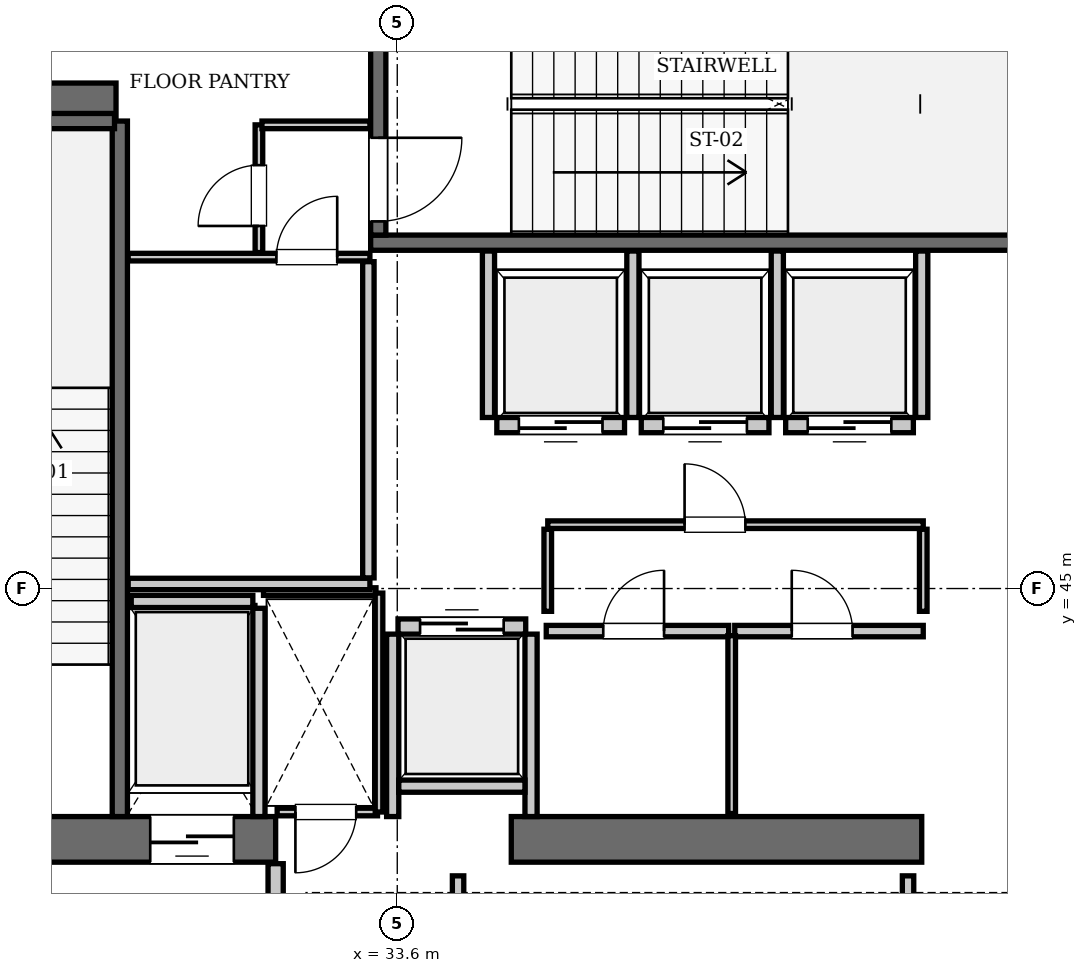
"""IFC4 building model, lengths in metres.
Left out: names, types, materials, properties, quantities, classifications, styles, units other than length and angle.
Written with IfcOpenShell. Run it as: python <this file> out.ifc"""

import sys

from ifc_helpers import new_model, si_unit, direction, frame, frame_2d, origin, place, context, subcontext, project, spatial, rectangle, extrude, element, fill, save


model = new_model("IFC4")
c1 = context("Model", 3, precision=1e-05, world=origin(), true_north=direction((0.0, 1.0)))
c2 = subcontext(c1, "Body", "Model", "MODEL_VIEW")
j1 = project(units=[si_unit("LENGTHUNIT", "METRE"), si_unit("PLANEANGLEUNIT", "RADIAN")], contexts=[c1])
p1 = place(None, origin())
s1 = spatial("IfcSite", under=j1, at=p1, CompositionType="ELEMENT")
p2 = place(p1, origin())
s2 = spatial("IfcBuilding", under=s1, at=p2, CompositionType="ELEMENT")
p3 = place(p2, frame((0.0, 0.0, 354.2)))
s3 = spatial("IfcBuildingStorey", under=s2, at=p3, CompositionType="ELEMENT", Elevation=354.2)
p4 = place(p3, frame((25.2, 41.7, 0.0), z_axis=(0.0, 0.0, 1.0), x_axis=(1.0, 0.0, 0.0)))
e1 = element("IfcWall", 1, at=p4, inside=s3, PredefinedType="SHEAR", context=c2, shape_type="SweptSolid", body=[
    extrude(rectangle(XDim=6.8, YDim=0.6, at=frame_2d((3.4, 0.0))), origin(), (0.0, 0.0, 1.0), 4.9),
])
p5 = place(p4, frame((1.65, 0.0, 0.0)))
e2 = element("IfcOpeningElement", 2, at=p5, cuts=e1, PredefinedType="OPENING", context=c2, shape_type="SweptSolid", body=[
    extrude(rectangle(XDim=1.15, YDim=2.15, at=frame_2d((0.575, 1.075))), frame((0.0, 0.31, 0.0), z_axis=(0.0, -1.0, 0.0), x_axis=(1.0, 0.0, 0.0)), (0.0, 0.0, 1.0), 0.62),
])
p6 = place(p4, frame((5.15, 0.0, 0.0)))
e3 = element("IfcOpeningElement", 3, at=p6, cuts=e1, PredefinedType="OPENING", context=c2, shape_type="SweptSolid", body=[
    extrude(rectangle(XDim=1.1, YDim=2.2, at=frame_2d((0.55, 1.1))), frame((0.0, 0.31, 0.0), z_axis=(0.0, -1.0, 0.0), x_axis=(1.0, 0.0, 0.0)), (0.0, 0.0, 1.0), 0.62),
])
p7 = place(p3, frame((35.1, 41.7, 0.0), z_axis=(0.0, 0.0, 1.0), x_axis=(1.0, 0.0, 0.0)))
e4 = element("IfcWall", 4, at=p7, inside=s3, PredefinedType="SHEAR", context=c2, shape_type="SweptSolid", body=[
    extrude(rectangle(XDim=5.4, YDim=0.6, at=frame_2d((2.7, 0.0))), origin(), (0.0, 0.0, 1.0), 4.9),
])
p8 = place(p3, frame((25.8, 51.4, 0.0), z_axis=(0.0, 0.0, 1.0), x_axis=(1.0, 0.0, 0.0)))
e5 = element("IfcWall", 5, at=p8, inside=s3, PredefinedType="SHEAR", context=c2, shape_type="SweptSolid", body=[
    extrude(rectangle(XDim=4.1, YDim=0.5, at=frame_2d((2.05, 0.0))), origin(), (0.0, 0.0, 1.0), 4.9),
])
p9 = place(p3, frame((29.95, 42.0, 0.0), z_axis=(0.0, 0.0, 1.0), x_axis=(0.0, 1.0, 0.0)))
e6 = element("IfcWall", 6, at=p9, inside=s3, PredefinedType="SOLIDWALL", context=c2, shape_type="SweptSolid", body=[
    extrude(rectangle(XDim=9.15, YDim=0.2, at=frame_2d((4.575, 0.0))), origin(), (0.0, 0.0, 1.0), 4.64),
])
p10 = place(p3, frame((26.38, 51.15, 0.0), z_axis=(0.0, 0.0, 1.0), x_axis=(1.0, 0.0, 0.0)))
e7 = element("IfcWall", 7, at=p10, inside=s3, PredefinedType="SOLIDWALL", context=c2, shape_type="SweptSolid", body=[
    extrude(rectangle(XDim=3.5, YDim=0.2, at=frame_2d((1.75, 0.0))), origin(), (0.0, 0.0, 1.0), 4.64),
])
p11 = place(p3, frame((33.25, 49.55, 0.0), z_axis=(0.0, 0.0, 1.0), x_axis=(1.0, 0.0, 0.0)))
e8 = element("IfcWall", 8, at=p11, inside=s3, PredefinedType="SOLIDWALL", context=c2, shape_type="SweptSolid", body=[
    extrude(rectangle(XDim=9.1, YDim=0.2, at=frame_2d((4.55, 0.0))), origin(), (0.0, 0.0, 1.0), 4.64),
])
p12 = place(p3, frame((33.35, 49.65, 0.0), z_axis=(0.0, 0.0, 1.0), x_axis=(0.0, 1.0, 0.0)))
e9 = element("IfcWall", 9, at=p12, inside=s3, PredefinedType="SOLIDWALL", context=c2, shape_type="SweptSolid", body=[
    extrude(rectangle(XDim=3.75, YDim=0.2, at=frame_2d((1.875, 0.0))), origin(), (0.0, 0.0, 1.0), 4.64),
])
p13 = place(p12, frame((0.18, 0.0, 0.0)))
e10 = element("IfcOpeningElement", 10, at=p13, cuts=e9, PredefinedType="OPENING", context=c2, shape_type="SweptSolid", body=[
    extrude(rectangle(XDim=1.1, YDim=2.15, at=frame_2d((0.55, 1.075))), frame((0.0, 0.11, 0.0), z_axis=(0.0, -1.0, 0.0), x_axis=(1.0, 0.0, 0.0)), (0.0, 0.0, 1.0), 0.22),
])
p14 = place(p3, frame((34.91, 47.15, 0.0), z_axis=(0.0, 0.0, 1.0), x_axis=(1.0, 0.0, 0.0)))
e11 = element("IfcWall", 11, at=p14, inside=s3, PredefinedType="SOLIDWALL", context=c2, shape_type="SweptSolid", body=[
    extrude(rectangle(XDim=1.68, YDim=0.2, at=frame_2d((0.84, 0.0))), origin(), (0.0, 0.0, 1.0), 4.64),
])
p15 = place(p14, frame((0.29, 0.0, 0.0)))
e12 = element("IfcOpeningElement", 12, at=p15, cuts=e11, PredefinedType="OPENING", context=c2, shape_type="SweptSolid", body=[
    extrude(rectangle(XDim=1.1, YDim=2.2, at=frame_2d((0.55, 1.1))), frame((0.0, 0.11, 0.0), z_axis=(0.0, -1.0, 0.0), x_axis=(1.0, 0.0, 0.0)), (0.0, 0.0, 1.0), 0.22),
])
p16 = place(p3, frame((36.81, 47.15, 0.0), z_axis=(0.0, 0.0, 1.0), x_axis=(1.0, 0.0, 0.0)))
e13 = element("IfcWall", 13, at=p16, inside=s3, PredefinedType="SOLIDWALL", context=c2, shape_type="SweptSolid", body=[
    extrude(rectangle(XDim=1.68, YDim=0.2, at=frame_2d((0.84, 0.0))), origin(), (0.0, 0.0, 1.0), 4.64),
])
p17 = place(p16, frame((0.29, 0.0, 0.0)))
e14 = element("IfcOpeningElement", 14, at=p17, cuts=e13, PredefinedType="OPENING", context=c2, shape_type="SweptSolid", body=[
    extrude(rectangle(XDim=1.1, YDim=2.2, at=frame_2d((0.55, 1.1))), frame((0.0, 0.11, 0.0), z_axis=(0.0, -1.0, 0.0), x_axis=(1.0, 0.0, 0.0)), (0.0, 0.0, 1.0), 0.22),
])
p18 = place(p3, frame((38.71, 47.15, 0.0), z_axis=(0.0, 0.0, 1.0), x_axis=(1.0, 0.0, 0.0)))
e15 = element("IfcWall", 15, at=p18, inside=s3, PredefinedType="SOLIDWALL", context=c2, shape_type="SweptSolid", body=[
    extrude(rectangle(XDim=1.68, YDim=0.2, at=frame_2d((0.84, 0.0))), origin(), (0.0, 0.0, 1.0), 4.64),
])
p19 = place(p18, frame((0.29, 0.0, 0.0)))
e16 = element("IfcOpeningElement", 16, at=p19, cuts=e15, PredefinedType="OPENING", context=c2, shape_type="SweptSolid", body=[
    extrude(rectangle(XDim=1.1, YDim=2.2, at=frame_2d((0.55, 1.1))), frame((0.0, 0.11, 0.0), z_axis=(0.0, -1.0, 0.0), x_axis=(1.0, 0.0, 0.0)), (0.0, 0.0, 1.0), 0.22),
])
p20 = place(p3, frame((33.61, 44.5, 0.0), z_axis=(0.0, 0.0, 1.0), x_axis=(1.0, 0.0, 0.0)))
e17 = element("IfcWall", 17, at=p20, inside=s3, PredefinedType="SOLIDWALL", context=c2, shape_type="SweptSolid", body=[
    extrude(rectangle(XDim=1.68, YDim=0.2, at=frame_2d((0.84, 0.0))), origin(), (0.0, 0.0, 1.0), 4.64),
])
p21 = place(p20, frame((0.29, 0.0, 0.0)))
e18 = element("IfcOpeningElement", 18, at=p21, cuts=e17, PredefinedType="OPENING", context=c2, shape_type="SweptSolid", body=[
    extrude(rectangle(XDim=1.1, YDim=2.2, at=frame_2d((0.55, 1.1))), frame((0.0, 0.11, 0.0), z_axis=(0.0, -1.0, 0.0), x_axis=(1.0, 0.0, 0.0)), (0.0, 0.0, 1.0), 0.22),
])
p22 = place(p3, frame((30.1, 44.83, 0.0), z_axis=(0.0, 0.0, 1.0), x_axis=(1.0, 0.0, 0.0)))
e19 = element("IfcWall", 19, at=p22, inside=s3, PredefinedType="SOLIDWALL", context=c2, shape_type="SweptSolid", body=[
    extrude(rectangle(XDim=1.6, YDim=0.16, at=frame_2d((0.8, 0.0))), origin(), (0.0, 0.0, 1.0), 4.64),
])
p23 = place(p3, frame((31.78, 42.0, 0.0), z_axis=(0.0, 0.0, 1.0), x_axis=(0.0, 1.0, 0.0)))
e20 = element("IfcWall", 20, at=p23, inside=s3, PredefinedType="SOLIDWALL", context=c2, shape_type="SweptSolid", body=[
    extrude(rectangle(XDim=2.74, YDim=0.16, at=frame_2d((1.37, 0.0))), origin(), (0.0, 0.0, 1.0), 4.64),
])
for number, where, z_axis, x_axis in (
    (21, (34.8, 47.25, 0.0), (0.0, 0.0, 1.0), (0.0, 1.0, 0.0)),
    (22, (36.7, 47.25, 0.0), (0.0, 0.0, 1.0), (0.0, 1.0, 0.0)),
    (23, (38.6, 47.25, 0.0), (0.0, 0.0, 1.0), (0.0, 1.0, 0.0)),
    (24, (40.5, 47.25, 0.0), (0.0, 0.0, 1.0), (0.0, 1.0, 0.0)),
):
    element("IfcWall", number, at=place(p3, frame(where, z_axis=z_axis, x_axis=x_axis)), inside=s3, PredefinedType="SOLIDWALL", context=c2, shape_type="SweptSolid", body=[
        extrude(rectangle(XDim=2.19, YDim=0.16, at=frame_2d((1.095, 0.0))), origin(), (0.0, 0.0, 1.0), 4.64),
    ])
for number, where, z_axis, x_axis in (
    (25, (33.54, 42.0, 0.0), (0.0, 0.0, 1.0), (0.0, 1.0, 0.0)),
    (26, (35.36, 42.0, 0.0), (0.0, 0.0, 1.0), (0.0, 1.0, 0.0)),
):
    element("IfcWall", number, at=place(p3, frame(where, z_axis=z_axis, x_axis=x_axis)), inside=s3, PredefinedType="SOLIDWALL", context=c2, shape_type="SweptSolid", body=[
        extrude(rectangle(XDim=2.4, YDim=0.16, at=frame_2d((1.2, 0.0))), origin(), (0.0, 0.0, 1.0), 4.64),
    ])
p24 = place(p3, frame((33.62, 42.4, 0.0), z_axis=(0.0, 0.0, 1.0), x_axis=(1.0, 0.0, 0.0)))
e27 = element("IfcWall", 27, at=p24, inside=s3, PredefinedType="SOLIDWALL", context=c2, shape_type="SweptSolid", body=[
    extrude(rectangle(XDim=1.66, YDim=0.16, at=frame_2d((0.83, 0.0))), origin(), (0.0, 0.0, 1.0), 4.64),
])
p25 = place(p3, frame((32.0, 38.31, 0.0), z_axis=(0.0, 0.0, 1.0), x_axis=(0.0, 1.0, 0.0)))
e28 = element("IfcWall", 28, at=p25, inside=s3, PredefinedType="PARTITIONING", context=c2, shape_type="SweptSolid", body=[
    extrude(rectangle(XDim=3.07, YDim=0.2, at=frame_2d((1.535, 0.0))), origin(), (0.0, 0.0, 1.0), 4.64),
])
p26 = place(p3, frame((32.02, 42.06, 0.0), z_axis=(0.0, 0.0, 1.0), x_axis=(1.0, 0.0, 0.0)))
e29 = element("IfcWall", 29, at=p26, inside=s3, PredefinedType="PARTITIONING", context=c2, shape_type="SweptSolid", body=[
    extrude(rectangle(XDim=1.32, YDim=0.1, at=frame_2d((0.66, 0.0))), origin(), (0.0, 0.0, 1.0), 4.64),
])
p27 = place(p26, frame((0.24, 0.0, 0.0)))
e30 = element("IfcOpeningElement", 30, at=p27, cuts=e29, PredefinedType="OPENING", context=c2, shape_type="SweptSolid", body=[
    extrude(rectangle(XDim=0.8, YDim=2.05, at=frame_2d((0.4, 1.025))), frame((0.0, 0.06, 0.0), z_axis=(0.0, -1.0, 0.0), x_axis=(1.0, 0.0, 0.0)), (0.0, 0.0, 1.0), 0.12),
])
p28 = place(p3, frame((31.84, 44.96, 0.0), z_axis=(0.0, 0.0, 1.0), x_axis=(1.0, 0.0, 0.0)))
e31 = element("IfcWall", 31, at=p28, inside=s3, PredefinedType="PARTITIONING", context=c2, shape_type="SweptSolid", body=[
    extrude(rectangle(XDim=1.48, YDim=0.1, at=frame_2d((0.74, 0.0))), origin(), (0.0, 0.0, 1.0), 4.64),
])
p29 = place(p3, frame((33.36, 42.06, 0.0), z_axis=(0.0, 0.0, 1.0), x_axis=(0.0, 1.0, 0.0)))
e32 = element("IfcWall", 32, at=p29, inside=s3, PredefinedType="PARTITIONING", context=c2, shape_type="SweptSolid", body=[
    extrude(rectangle(XDim=2.88, YDim=0.1, at=frame_2d((1.44, 0.0))), origin(), (0.0, 0.0, 1.0), 4.64),
])
p30 = place(p3, frame((35.58, 45.84, 0.0), z_axis=(0.0, 0.0, 1.0), x_axis=(1.0, 0.0, 0.0)))
e33 = element("IfcWall", 33, at=p30, inside=s3, PredefinedType="PARTITIONING", context=c2, shape_type="SweptSolid", body=[
    extrude(rectangle(XDim=4.94, YDim=0.1, at=frame_2d((2.47, 0.0))), origin(), (0.0, 0.0, 1.0), 4.64),
])
p31 = place(p30, frame((1.8, 0.0, 0.0)))
e34 = element("IfcOpeningElement", 34, at=p31, cuts=e33, PredefinedType="OPENING", context=c2, shape_type="SweptSolid", body=[
    extrude(rectangle(XDim=0.8, YDim=2.05, at=frame_2d((0.4, 1.025))), frame((0.0, 0.06, 0.0), z_axis=(0.0, -1.0, 0.0), x_axis=(1.0, 0.0, 0.0)), (0.0, 0.0, 1.0), 0.12),
])
for number, where, z_axis, x_axis in (
    (35, (35.58, 44.7, 0.0), (0.0, 0.0, 1.0), (0.0, 1.0, 0.0)),
    (36, (40.52, 44.7, 0.0), (0.0, 0.0, 1.0), (0.0, 1.0, 0.0)),
):
    element("IfcWall", number, at=place(p3, frame(where, z_axis=z_axis, x_axis=x_axis)), inside=s3, PredefinedType="PARTITIONING", context=c2, shape_type="SweptSolid", body=[
        extrude(rectangle(XDim=1.08, YDim=0.1, at=frame_2d((0.54, 0.0))), origin(), (0.0, 0.0, 1.0), 4.64),
    ])
p32 = place(p3, frame((35.56, 44.44, 0.0), z_axis=(0.0, 0.0, 1.0), x_axis=(1.0, 0.0, 0.0)))
e37 = element("IfcWall", 37, at=p32, inside=s3, PredefinedType="PARTITIONING", context=c2, shape_type="SweptSolid", body=[
    extrude(rectangle(XDim=2.4, YDim=0.15, at=frame_2d((1.2, 0.0))), origin(), (0.0, 0.0, 1.0), 4.64),
])
p33 = place(p32, frame((0.75, 0.0, 0.0)))
e38 = element("IfcOpeningElement", 38, at=p33, cuts=e37, PredefinedType="OPENING", context=c2, shape_type="SweptSolid", body=[
    extrude(rectangle(XDim=0.8, YDim=2.05, at=frame_2d((0.4, 1.025))), frame((0.0, 0.085, 0.0), z_axis=(0.0, -1.0, 0.0), x_axis=(1.0, 0.0, 0.0)), (0.0, 0.0, 1.0), 0.17),
])
p34 = place(p3, frame((38.04, 44.44, 0.0), z_axis=(0.0, 0.0, 1.0), x_axis=(1.0, 0.0, 0.0)))
e39 = element("IfcWall", 39, at=p34, inside=s3, PredefinedType="PARTITIONING", context=c2, shape_type="SweptSolid", body=[
    extrude(rectangle(XDim=2.48, YDim=0.15, at=frame_2d((1.24, 0.0))), origin(), (0.0, 0.0, 1.0), 4.64),
])
p35 = place(p34, frame((0.75, 0.0, 0.0)))
e40 = element("IfcOpeningElement", 40, at=p35, cuts=e39, PredefinedType="OPENING", context=c2, shape_type="SweptSolid", body=[
    extrude(rectangle(XDim=0.8, YDim=2.05, at=frame_2d((0.4, 1.025))), frame((0.0, 0.085, 0.0), z_axis=(0.0, -1.0, 0.0), x_axis=(1.0, 0.0, 0.0)), (0.0, 0.0, 1.0), 0.17),
])
p36 = place(p3, frame((38.0, 42.04, 0.0), z_axis=(0.0, 0.0, 1.0), x_axis=(0.0, 1.0, 0.0)))
e41 = element("IfcWall", 41, at=p36, inside=s3, PredefinedType="PARTITIONING", context=c2, shape_type="SweptSolid", body=[
    extrude(rectangle(XDim=2.34, YDim=0.1, at=frame_2d((1.17, 0.0))), origin(), (0.0, 0.0, 1.0), 4.64),
])
p37 = place(p3, frame((30.06, 45.06, 0.0), z_axis=(0.0, 0.0, 1.0), x_axis=(1.0, 0.0, 0.0)))
e42 = element("IfcWall", 42, at=p37, inside=s3, PredefinedType="PARTITIONING", context=c2, shape_type="SweptSolid", body=[
    extrude(rectangle(XDim=3.18, YDim=0.15, at=frame_2d((1.59, 0.0))), origin(), (0.0, 0.0, 1.0), 4.64),
])
p38 = place(p3, frame((33.22, 45.14, 0.0), z_axis=(0.0, 0.0, 1.0), x_axis=(0.0, 1.0, 0.0)))
e43 = element("IfcWall", 43, at=p38, inside=s3, PredefinedType="PARTITIONING", context=c2, shape_type="SweptSolid", body=[
    extrude(rectangle(XDim=4.16, YDim=0.15, at=frame_2d((2.08, 0.0))), origin(), (0.0, 0.0, 1.0), 4.64),
])
p39 = place(p3, frame((30.06, 49.36, 0.0), z_axis=(0.0, 0.0, 1.0), x_axis=(1.0, 0.0, 0.0)))
e44 = element("IfcWall", 44, at=p39, inside=s3, PredefinedType="PARTITIONING", context=c2, shape_type="SweptSolid", body=[
    extrude(rectangle(XDim=3.18, YDim=0.1, at=frame_2d((1.59, 0.0))), origin(), (0.0, 0.0, 1.0), 4.64),
])
p40 = place(p39, frame((1.95, 0.0, 0.0)))
e45 = element("IfcOpeningElement", 45, at=p40, cuts=e44, PredefinedType="OPENING", context=c2, shape_type="SweptSolid", body=[
    extrude(rectangle(XDim=0.8, YDim=2.05, at=frame_2d((0.4, 1.025))), frame((0.0, 0.06, 0.0), z_axis=(0.0, -1.0, 0.0), x_axis=(1.0, 0.0, 0.0)), (0.0, 0.0, 1.0), 0.12),
])
p41 = place(p3, frame((31.78, 49.42, 0.0), z_axis=(0.0, 0.0, 1.0), x_axis=(0.0, 1.0, 0.0)))
e46 = element("IfcWall", 46, at=p41, inside=s3, PredefinedType="PARTITIONING", context=c2, shape_type="SweptSolid", body=[
    extrude(rectangle(XDim=1.68, YDim=0.1, at=frame_2d((0.84, 0.0))), origin(), (0.0, 0.0, 1.0), 4.64),
])
p42 = place(p41, frame((0.35, 0.0, 0.0)))
e47 = element("IfcOpeningElement", 47, at=p42, cuts=e46, PredefinedType="OPENING", context=c2, shape_type="SweptSolid", body=[
    extrude(rectangle(XDim=0.8, YDim=2.05, at=frame_2d((0.4, 1.025))), frame((0.0, 0.06, 0.0), z_axis=(0.0, -1.0, 0.0), x_axis=(1.0, 0.0, 0.0)), (0.0, 0.0, 1.0), 0.12),
])
p43 = place(p3, frame((31.82, 51.1, 0.0), z_axis=(0.0, 0.0, 1.0), x_axis=(1.0, 0.0, 0.0)))
e48 = element("IfcWall", 48, at=p43, inside=s3, PredefinedType="PARTITIONING", context=c2, shape_type="SweptSolid", body=[
    extrude(rectangle(XDim=1.42, YDim=0.1, at=frame_2d((0.71, 0.0))), origin(), (0.0, 0.0, 1.0), 4.64),
])
for number, where, z_axis, x_axis in (
    (49, (34.4, 38.38, 0.0), (0.0, 0.0, 1.0), (0.0, 1.0, 0.0)),
    (50, (40.32, 38.38, 0.0), (0.0, 0.0, 1.0), (0.0, 1.0, 0.0)),
):
    element("IfcWall", number, at=place(p3, frame(where, z_axis=z_axis, x_axis=x_axis)), inside=s3, PredefinedType="PARTITIONING", context=c2, shape_type="SweptSolid", body=[
        extrude(rectangle(XDim=2.84, YDim=0.15, at=frame_2d((1.42, 0.0))), origin(), (0.0, 0.0, 1.0), 4.64),
    ])
p44 = place(p13, frame((1.1, 0.0, 0.0), z_axis=(0.0, 0.0, 1.0), x_axis=(-1.0, 0.0, 0.0)))
e51 = element("IfcDoor", 51, at=p44, inside=s3, OperationType="SINGLE_SWING_LEFT", PredefinedType="DOOR", context=c2, shape_type="SweptSolid", body=[
    extrude(rectangle(XDim=1.1, YDim=2.15, at=frame_2d((0.55, 1.075))), frame((0.0, 0.025, 0.0), z_axis=(0.0, -1.0, 0.0), x_axis=(1.0, 0.0, 0.0)), (0.0, 0.0, 1.0), 0.05),
])
fill(e10, e51)
p45 = place(p15, frame((1.1, 0.0, 0.0), z_axis=(0.0, 0.0, 1.0), x_axis=(-1.0, 0.0, 0.0)))
e52 = element("IfcDoor", 52, at=p45, inside=s3, OperationType="SLIDING_TO_RIGHT", PredefinedType="DOOR", context=c2, shape_type="SweptSolid", body=[
    extrude(rectangle(XDim=1.1, YDim=2.2, at=frame_2d((0.55, 1.1))), frame((0.0, 0.025, 0.0), z_axis=(0.0, -1.0, 0.0), x_axis=(1.0, 0.0, 0.0)), (0.0, 0.0, 1.0), 0.05),
])
fill(e12, e52)
p46 = place(p17, frame((1.1, 0.0, 0.0), z_axis=(0.0, 0.0, 1.0), x_axis=(-1.0, 0.0, 0.0)))
e53 = element("IfcDoor", 53, at=p46, inside=s3, OperationType="SLIDING_TO_RIGHT", PredefinedType="DOOR", context=c2, shape_type="SweptSolid", body=[
    extrude(rectangle(XDim=1.1, YDim=2.2, at=frame_2d((0.55, 1.1))), frame((0.0, 0.025, 0.0), z_axis=(0.0, -1.0, 0.0), x_axis=(1.0, 0.0, 0.0)), (0.0, 0.0, 1.0), 0.05),
])
fill(e14, e53)
p47 = place(p19, frame((1.1, 0.0, 0.0), z_axis=(0.0, 0.0, 1.0), x_axis=(-1.0, 0.0, 0.0)))
e54 = element("IfcDoor", 54, at=p47, inside=s3, OperationType="SLIDING_TO_RIGHT", PredefinedType="DOOR", context=c2, shape_type="SweptSolid", body=[
    extrude(rectangle(XDim=1.1, YDim=2.2, at=frame_2d((0.55, 1.1))), frame((0.0, 0.025, 0.0), z_axis=(0.0, -1.0, 0.0), x_axis=(1.0, 0.0, 0.0)), (0.0, 0.0, 1.0), 0.05),
])
fill(e16, e54)
p48 = place(p21, origin())
e55 = element("IfcDoor", 55, at=p48, inside=s3, OperationType="SLIDING_TO_RIGHT", PredefinedType="DOOR", context=c2, shape_type="SweptSolid", body=[
    extrude(rectangle(XDim=1.1, YDim=2.2, at=frame_2d((0.55, 1.1))), frame((0.0, 0.025, 0.0), z_axis=(0.0, -1.0, 0.0), x_axis=(1.0, 0.0, 0.0)), (0.0, 0.0, 1.0), 0.05),
])
fill(e18, e55)
p49 = place(p6, frame((1.1, 0.0, 0.0), z_axis=(0.0, 0.0, 1.0), x_axis=(-1.0, 0.0, 0.0)))
e56 = element("IfcDoor", 56, at=p49, inside=s3, OperationType="SLIDING_TO_LEFT", PredefinedType="DOOR", context=c2, shape_type="SweptSolid", body=[
    extrude(rectangle(XDim=1.1, YDim=2.2, at=frame_2d((0.55, 1.1))), frame((0.0, 0.025, 0.0), z_axis=(0.0, -1.0, 0.0), x_axis=(1.0, 0.0, 0.0)), (0.0, 0.0, 1.0), 0.05),
])
fill(e3, e56)
p50 = place(p27, frame((0.8, 0.0, 0.0), z_axis=(0.0, 0.0, 1.0), x_axis=(-1.0, 0.0, 0.0)))
e57 = element("IfcDoor", 57, at=p50, inside=s3, OperationType="SINGLE_SWING_RIGHT", PredefinedType="DOOR", context=c2, shape_type="SweptSolid", body=[
    extrude(rectangle(XDim=0.8, YDim=2.05, at=frame_2d((0.4, 1.025))), frame((0.0, 0.025, 0.0), z_axis=(0.0, -1.0, 0.0), x_axis=(1.0, 0.0, 0.0)), (0.0, 0.0, 1.0), 0.05),
])
fill(e30, e57)
p51 = place(p31, origin())
e58 = element("IfcDoor", 58, at=p51, inside=s3, OperationType="SINGLE_SWING_LEFT", PredefinedType="DOOR", context=c2, shape_type="SweptSolid", body=[
    extrude(rectangle(XDim=0.8, YDim=2.05, at=frame_2d((0.4, 1.025))), frame((0.0, 0.025, 0.0), z_axis=(0.0, -1.0, 0.0), x_axis=(1.0, 0.0, 0.0)), (0.0, 0.0, 1.0), 0.05),
])
fill(e34, e58)
p52 = place(p33, origin())
e59 = element("IfcDoor", 59, at=p52, inside=s3, OperationType="SINGLE_SWING_RIGHT", PredefinedType="DOOR", context=c2, shape_type="SweptSolid", body=[
    extrude(rectangle(XDim=0.8, YDim=2.05, at=frame_2d((0.4, 1.025))), frame((0.0, 0.025, 0.0), z_axis=(0.0, -1.0, 0.0), x_axis=(1.0, 0.0, 0.0)), (0.0, 0.0, 1.0), 0.05),
])
fill(e38, e59)
p53 = place(p35, origin())
e60 = element("IfcDoor", 60, at=p53, inside=s3, OperationType="SINGLE_SWING_LEFT", PredefinedType="DOOR", context=c2, shape_type="SweptSolid", body=[
    extrude(rectangle(XDim=0.8, YDim=2.05, at=frame_2d((0.4, 1.025))), frame((0.0, 0.025, 0.0), z_axis=(0.0, -1.0, 0.0), x_axis=(1.0, 0.0, 0.0)), (0.0, 0.0, 1.0), 0.05),
])
fill(e40, e60)
p54 = place(p40, origin())
e61 = element("IfcDoor", 61, at=p54, inside=s3, OperationType="SINGLE_SWING_RIGHT", PredefinedType="DOOR", context=c2, shape_type="SweptSolid", body=[
    extrude(rectangle(XDim=0.8, YDim=2.05, at=frame_2d((0.4, 1.025))), frame((0.0, 0.025, 0.0), z_axis=(0.0, -1.0, 0.0), x_axis=(1.0, 0.0, 0.0)), (0.0, 0.0, 1.0), 0.05),
])
fill(e45, e61)
p55 = place(p42, origin())
e62 = element("IfcDoor", 62, at=p55, inside=s3, OperationType="SINGLE_SWING_LEFT", PredefinedType="DOOR", context=c2, shape_type="SweptSolid", body=[
    extrude(rectangle(XDim=0.8, YDim=2.05, at=frame_2d((0.4, 1.025))), frame((0.0, 0.025, 0.0), z_axis=(0.0, -1.0, 0.0), x_axis=(1.0, 0.0, 0.0)), (0.0, 0.0, 1.0), 0.05),
])
fill(e47, e62)
save(model, sys.argv[1])
